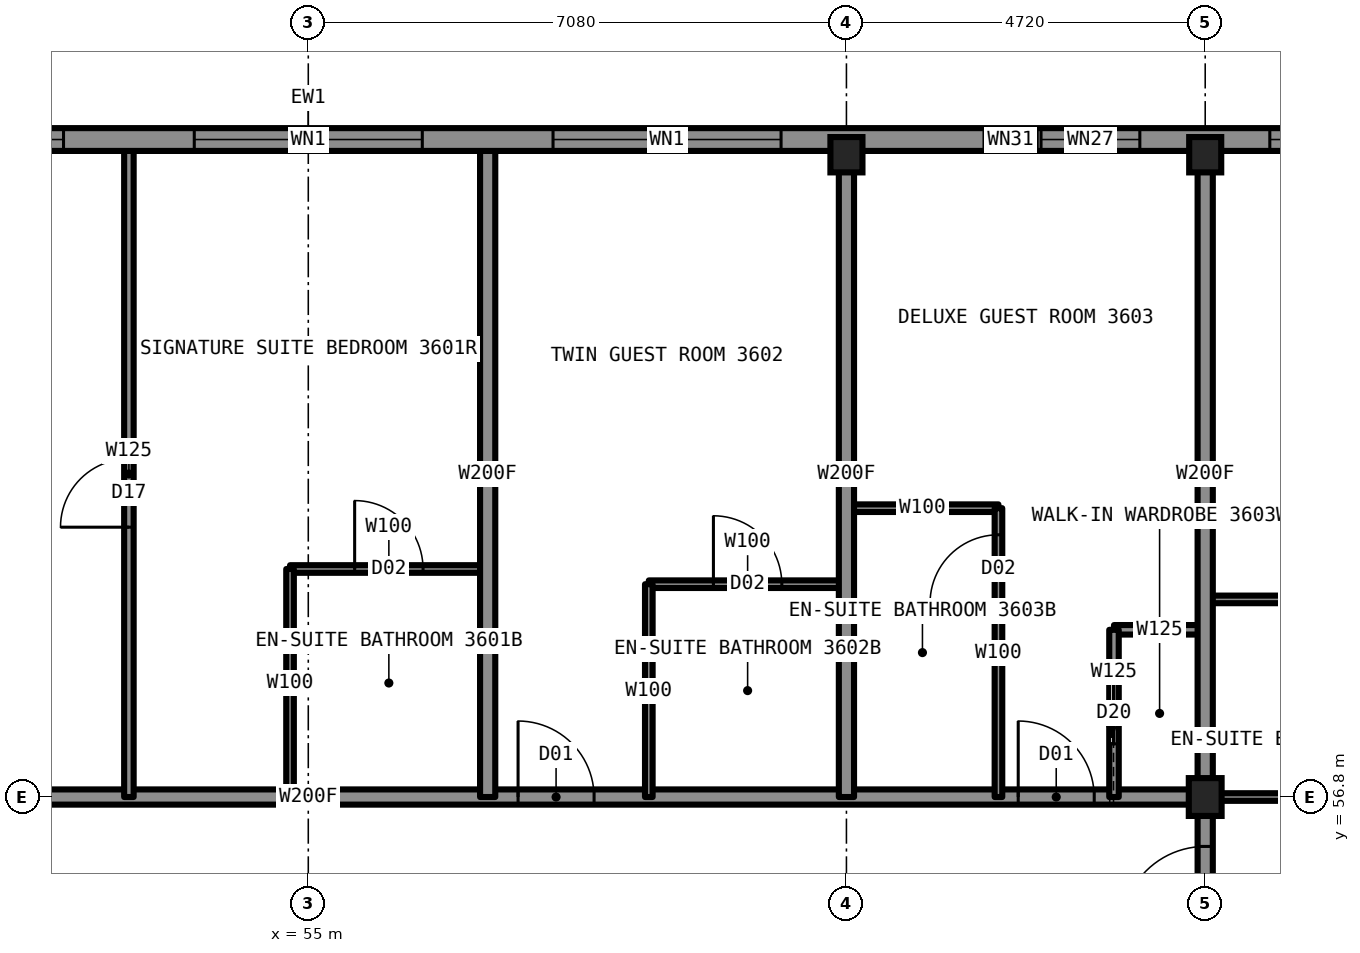
"""IFC4 building model, lengths in metres.
Left out: names, types, materials, properties, quantities, classifications, styles, units other than length and angle.
Written with IfcOpenShell. Run it as: python <this file> out.ifc"""

import sys

from ifc_helpers import new_model, si_unit, direction, frame, frame_2d, origin, origin_2d, place, context, subcontext, project, spatial, rectangle, i_section, extrude, element, fill, save


model = new_model("IFC4")
c1 = context("Model", 3, precision=1e-05, world=origin(), true_north=direction((0.0, 1.0)))
c2 = subcontext(c1, "Body", "Model", "MODEL_VIEW")
j1 = project(units=[si_unit("LENGTHUNIT", "METRE"), si_unit("PLANEANGLEUNIT", "RADIAN")], contexts=[c1])
p1 = place(None, origin())
s1 = spatial("IfcSite", under=j1, at=p1, CompositionType="ELEMENT")
p2 = place(p1, origin())
s2 = spatial("IfcBuilding", under=s1, at=p2, CompositionType="ELEMENT")
p3 = place(p2, frame((0.0, 0.0, 135.4)))
s3 = spatial("IfcBuildingStorey", under=s2, at=p3, CompositionType="ELEMENT", Elevation=135.4)
for number, where, z_axis, x_axis in (
    (1, (62.08, 65.25, 0.0), (0.0, 0.0, 1.0), (1.0, 0.0, 0.0)),
    (2, (66.8, 65.25, 0.0), (0.0, 0.0, 1.0), (1.0, 0.0, 0.0)),
):
    element("IfcColumn", number, at=place(p3, frame(where, z_axis=z_axis, x_axis=x_axis)), inside=s3, PredefinedType="COLUMN", context=c2, shape_type="SweptSolid", body=[
        extrude(i_section(OverallWidth=0.422, OverallDepth=0.465, WebThickness=0.045, FlangeThickness=0.073, at=origin_2d()), origin(), (0.0, 0.0, 1.0), 3.5),
    ])
p4 = place(p3, frame((66.8, 56.8, 0.0), z_axis=(0.0, 0.0, 1.0), x_axis=(1.0, 0.0, 0.0)))
e3 = element("IfcColumn", 3, at=p4, inside=s3, PredefinedType="COLUMN", context=c2, shape_type="SweptSolid", body=[
    extrude(i_section(OverallWidth=0.432, OverallDepth=0.498, WebThickness=0.056, FlangeThickness=0.089, at=origin_2d()), origin(), (0.0, 0.0, 1.0), 3.5),
])
p5 = place(p3, frame((66.8, 56.8, 0.0), z_axis=(0.0, 0.0, 1.0), x_axis=(1.0, 0.0, 0.0)))
e4 = element("IfcWall", 4, at=p5, inside=s3, PredefinedType="PARTITIONING", context=c2, shape_type="SweptSolid", body=[
    extrude(rectangle(XDim=2.6, YDim=0.1, at=frame_2d((1.3, 0.0))), origin(), (0.0, 0.0, 1.0), 2.573),
])
p6 = place(p3, frame((43.2, 56.8, 0.0), z_axis=(0.0, 0.0, 1.0), x_axis=(1.0, 0.0, 0.0)))
e5 = element("IfcWall", 5, at=p6, inside=s3, PredefinedType="PARTITIONING", context=c2, shape_type="SweptSolid", body=[
    extrude(rectangle(XDim=23.6, YDim=0.2, at=frame_2d((11.8, 0.0))), origin(), (0.0, 0.0, 1.0), 3.33),
])
p7 = place(p6, frame((1.85, 0.0, 0.0)))
e6 = element("IfcOpeningElement", 6, at=p7, cuts=e5, PredefinedType="OPENING", context=c2, shape_type="SweptSolid", body=[
    extrude(rectangle(XDim=1.1, YDim=2.2, at=frame_2d((0.55, 1.1))), frame((0.0, 0.11, 0.0), z_axis=(0.0, -1.0, 0.0), x_axis=(1.0, 0.0, 0.0)), (0.0, 0.0, 1.0), 0.22),
])
p8 = place(p6, frame((14.56, 0.0, 0.0)))
e7 = element("IfcOpeningElement", 7, at=p8, cuts=e5, PredefinedType="OPENING", context=c2, shape_type="SweptSolid", body=[
    extrude(rectangle(XDim=1.0, YDim=2.2, at=frame_2d((0.5, 1.1))), frame((0.0, 0.11, 0.0), z_axis=(0.0, -1.0, 0.0), x_axis=(1.0, 0.0, 0.0)), (0.0, 0.0, 1.0), 0.22),
])
p9 = place(p6, frame((21.14, 0.0, 0.0)))
e8 = element("IfcOpeningElement", 8, at=p9, cuts=e5, PredefinedType="OPENING", context=c2, shape_type="SweptSolid", body=[
    extrude(rectangle(XDim=1.0, YDim=2.2, at=frame_2d((0.5, 1.1))), frame((0.0, 0.11, 0.0), z_axis=(0.0, -1.0, 0.0), x_axis=(1.0, 0.0, 0.0)), (0.0, 0.0, 1.0), 0.22),
])
p10 = place(p3, frame((65.6, 59.0, 0.0), z_axis=(0.0, 0.0, 1.0), x_axis=(1.0, 0.0, 0.0)))
e9 = element("IfcWall", 9, at=p10, inside=s3, PredefinedType="PARTITIONING", context=c2, shape_type="SweptSolid", body=[
    extrude(rectangle(XDim=1.2, YDim=0.125, at=frame_2d((0.6, 0.0))), origin(), (0.0, 0.0, 1.0), 3.33),
])
p11 = place(p3, frame((66.8, 59.4, 0.0), z_axis=(0.0, 0.0, 1.0), x_axis=(1.0, 0.0, 0.0)))
e10 = element("IfcWall", 10, at=p11, inside=s3, PredefinedType="PARTITIONING", context=c2, shape_type="SweptSolid", body=[
    extrude(rectangle(XDim=2.6, YDim=0.1, at=frame_2d((1.3, 0.0))), origin(), (0.0, 0.0, 1.0), 3.33),
])
p12 = place(p3, frame((59.48, 59.6, 0.0), z_axis=(0.0, 0.0, 1.0), x_axis=(1.0, 0.0, 0.0)))
e11 = element("IfcWall", 11, at=p12, inside=s3, PredefinedType="PARTITIONING", context=c2, shape_type="SweptSolid", body=[
    extrude(rectangle(XDim=2.6, YDim=0.1, at=frame_2d((1.3, 0.0))), origin(), (0.0, 0.0, 1.0), 3.33),
])
p13 = place(p12, frame((0.85, 0.0, 0.0)))
e12 = element("IfcOpeningElement", 12, at=p13, cuts=e11, PredefinedType="OPENING", context=c2, shape_type="SweptSolid", body=[
    extrude(rectangle(XDim=0.9, YDim=2.1, at=frame_2d((0.45, 1.05))), frame((0.0, 0.06, 0.0), z_axis=(0.0, -1.0, 0.0), x_axis=(1.0, 0.0, 0.0)), (0.0, 0.0, 1.0), 0.12),
])
p14 = place(p3, frame((54.76, 59.8, 0.0), z_axis=(0.0, 0.0, 1.0), x_axis=(1.0, 0.0, 0.0)))
e13 = element("IfcWall", 13, at=p14, inside=s3, PredefinedType="PARTITIONING", context=c2, shape_type="SweptSolid", body=[
    extrude(rectangle(XDim=2.6, YDim=0.1, at=frame_2d((1.3, 0.0))), origin(), (0.0, 0.0, 1.0), 3.33),
])
p15 = place(p14, frame((0.85, 0.0, 0.0)))
e14 = element("IfcOpeningElement", 14, at=p15, cuts=e13, PredefinedType="OPENING", context=c2, shape_type="SweptSolid", body=[
    extrude(rectangle(XDim=0.9, YDim=2.1, at=frame_2d((0.45, 1.05))), frame((0.0, 0.06, 0.0), z_axis=(0.0, -1.0, 0.0), x_axis=(1.0, 0.0, 0.0)), (0.0, 0.0, 1.0), 0.12),
])
p16 = place(p3, frame((62.08, 60.6, 0.0), z_axis=(0.0, 0.0, 1.0), x_axis=(1.0, 0.0, 0.0)))
e15 = element("IfcWall", 15, at=p16, inside=s3, PredefinedType="PARTITIONING", context=c2, shape_type="SweptSolid", body=[
    extrude(rectangle(XDim=2.0, YDim=0.1, at=frame_2d((1.0, 0.0))), origin(), (0.0, 0.0, 1.0), 3.33),
])
p17 = place(p3, frame((54.76, 56.8, 0.0), z_axis=(0.0, 0.0, 1.0), x_axis=(0.0, 1.0, 0.0)))
e16 = element("IfcWall", 16, at=p17, inside=s3, PredefinedType="PARTITIONING", context=c2, shape_type="SweptSolid", body=[
    extrude(rectangle(XDim=3.0, YDim=0.1, at=frame_2d((1.5, 0.0))), origin(), (0.0, 0.0, 1.0), 3.33),
])
p18 = place(p3, frame((52.64, 56.8, 0.0), z_axis=(0.0, 0.0, 1.0), x_axis=(0.0, 1.0, 0.0)))
e17 = element("IfcWall", 17, at=p18, inside=s3, PredefinedType="PARTITIONING", context=c2, shape_type="SweptSolid", body=[
    extrude(rectangle(XDim=8.5, YDim=0.125, at=frame_2d((4.25, 0.0))), origin(), (0.0, 0.0, 1.0), 3.33),
])
p19 = place(p18, frame((3.55, 0.0, 0.0)))
e18 = element("IfcOpeningElement", 18, at=p19, cuts=e17, PredefinedType="OPENING", context=c2, shape_type="SweptSolid", body=[
    extrude(rectangle(XDim=0.9, YDim=2.2, at=frame_2d((0.45, 1.1))), frame((0.0, 0.073, 0.0), z_axis=(0.0, -1.0, 0.0), x_axis=(1.0, 0.0, 0.0)), (0.0, 0.0, 1.0), 0.145),
])
p20 = place(p3, frame((65.6, 56.8, 0.0), z_axis=(0.0, 0.0, 1.0), x_axis=(0.0, 1.0, 0.0)))
e19 = element("IfcWall", 19, at=p20, inside=s3, PredefinedType="PARTITIONING", context=c2, shape_type="SweptSolid", body=[
    extrude(rectangle(XDim=2.2, YDim=0.125, at=frame_2d((1.1, 0.0))), origin(), (0.0, 0.0, 1.0), 3.33),
])
p21 = place(p20, frame((0.7, 0.0, 0.0)))
e20 = element("IfcOpeningElement", 20, at=p21, cuts=e19, PredefinedType="OPENING", context=c2, shape_type="SweptSolid", body=[
    extrude(rectangle(XDim=0.8, YDim=2.1, at=frame_2d((0.4, 1.05))), frame((0.0, 0.073, 0.0), z_axis=(0.0, -1.0, 0.0), x_axis=(1.0, 0.0, 0.0)), (0.0, 0.0, 1.0), 0.145),
])
p22 = place(p3, frame((66.8, 33.2, 0.0), z_axis=(0.0, 0.0, 1.0), x_axis=(0.0, 1.0, 0.0)))
e21 = element("IfcWall", 21, at=p22, inside=s3, PredefinedType="PARTITIONING", context=c2, shape_type="SweptSolid", body=[
    extrude(rectangle(XDim=23.6, YDim=0.2, at=frame_2d((11.8, 0.0))), origin(), (0.0, 0.0, 1.0), 3.33),
])
p23 = place(p22, frame((7.27, 0.0, 0.0)))
e22 = element("IfcOpeningElement", 22, at=p23, cuts=e21, PredefinedType="OPENING", context=c2, shape_type="SweptSolid", body=[
    extrude(rectangle(XDim=1.0, YDim=2.2, at=frame_2d((0.5, 1.1))), frame((0.0, 0.11, 0.0), z_axis=(0.0, -1.0, 0.0), x_axis=(1.0, 0.0, 0.0)), (0.0, 0.0, 1.0), 0.22),
])
p24 = place(p22, frame((11.99, 0.0, 0.0)))
e23 = element("IfcOpeningElement", 23, at=p24, cuts=e21, PredefinedType="OPENING", context=c2, shape_type="SweptSolid", body=[
    extrude(rectangle(XDim=1.0, YDim=2.2, at=frame_2d((0.5, 1.1))), frame((0.0, 0.11, 0.0), z_axis=(0.0, -1.0, 0.0), x_axis=(1.0, 0.0, 0.0)), (0.0, 0.0, 1.0), 0.22),
])
p25 = place(p22, frame((17.31, 0.0, 0.0)))
e24 = element("IfcOpeningElement", 24, at=p25, cuts=e21, PredefinedType="OPENING", context=c2, shape_type="SweptSolid", body=[
    extrude(rectangle(XDim=1.0, YDim=2.2, at=frame_2d((0.5, 1.1))), frame((0.0, 0.11, 0.0), z_axis=(0.0, -1.0, 0.0), x_axis=(1.0, 0.0, 0.0)), (0.0, 0.0, 1.0), 0.22),
])
p26 = place(p22, frame((21.85, 0.0, 0.0)))
e25 = element("IfcOpeningElement", 25, at=p26, cuts=e21, PredefinedType="OPENING", context=c2, shape_type="SweptSolid", body=[
    extrude(rectangle(XDim=1.1, YDim=2.2, at=frame_2d((0.55, 1.1))), frame((0.0, 0.11, 0.0), z_axis=(0.0, -1.0, 0.0), x_axis=(1.0, 0.0, 0.0)), (0.0, 0.0, 1.0), 0.22),
])
p27 = place(p22, frame((0.65, 0.0, 0.0)))
e26 = element("IfcOpeningElement", 26, at=p27, cuts=e21, PredefinedType="OPENING", context=c2, shape_type="SweptSolid", body=[
    extrude(rectangle(XDim=1.1, YDim=2.2, at=frame_2d((0.55, 1.1))), frame((0.0, 0.11, 0.0), z_axis=(0.0, -1.0, 0.0), x_axis=(1.0, 0.0, 0.0)), (0.0, 0.0, 1.0), 0.22),
])
p28 = place(p3, frame((66.8, 56.8, 0.0), z_axis=(0.0, 0.0, 1.0), x_axis=(0.0, 1.0, 0.0)))
e27 = element("IfcWall", 27, at=p28, inside=s3, PredefinedType="PARTITIONING", context=c2, shape_type="SweptSolid", body=[
    extrude(rectangle(XDim=8.5, YDim=0.2, at=frame_2d((4.25, 0.0))), origin(), (0.0, 0.0, 1.0), 2.573),
])
p29 = place(p3, frame((57.36, 56.8, 0.0), z_axis=(0.0, 0.0, 1.0), x_axis=(0.0, 1.0, 0.0)))
e28 = element("IfcWall", 28, at=p29, inside=s3, PredefinedType="PARTITIONING", context=c2, shape_type="SweptSolid", body=[
    extrude(rectangle(XDim=8.5, YDim=0.2, at=frame_2d((4.25, 0.0))), origin(), (0.0, 0.0, 1.0), 3.33),
])
p30 = place(p3, frame((59.48, 56.8, 0.0), z_axis=(0.0, 0.0, 1.0), x_axis=(0.0, 1.0, 0.0)))
e29 = element("IfcWall", 29, at=p30, inside=s3, PredefinedType="PARTITIONING", context=c2, shape_type="SweptSolid", body=[
    extrude(rectangle(XDim=2.8, YDim=0.1, at=frame_2d((1.4, 0.0))), origin(), (0.0, 0.0, 1.0), 3.33),
])
p31 = place(p3, frame((62.08, 56.8, 0.0), z_axis=(0.0, 0.0, 1.0), x_axis=(0.0, 1.0, 0.0)))
e30 = element("IfcWall", 30, at=p31, inside=s3, PredefinedType="PARTITIONING", context=c2, shape_type="SweptSolid", body=[
    extrude(rectangle(XDim=8.5, YDim=0.2, at=frame_2d((4.25, 0.0))), origin(), (0.0, 0.0, 1.0), 2.573),
])
p32 = place(p3, frame((64.08, 56.8, 0.0), z_axis=(0.0, 0.0, 1.0), x_axis=(0.0, 1.0, 0.0)))
e31 = element("IfcWall", 31, at=p32, inside=s3, PredefinedType="PARTITIONING", context=c2, shape_type="SweptSolid", body=[
    extrude(rectangle(XDim=3.8, YDim=0.1, at=frame_2d((1.9, 0.0))), origin(), (0.0, 0.0, 1.0), 3.33),
])
p33 = place(p32, frame((2.55, 0.0, 0.0)))
e32 = element("IfcOpeningElement", 32, at=p33, cuts=e31, PredefinedType="OPENING", context=c2, shape_type="SweptSolid", body=[
    extrude(rectangle(XDim=0.9, YDim=2.1, at=frame_2d((0.45, 1.05))), frame((0.0, 0.06, 0.0), z_axis=(0.0, -1.0, 0.0), x_axis=(1.0, 0.0, 0.0)), (0.0, 0.0, 1.0), 0.12),
])
p34 = place(p3, frame((70.1, 65.45, 0.0), z_axis=(0.0, 0.0, 1.0), x_axis=(-1.0, 0.0, 0.0)))
e33 = element("IfcWall", 33, at=p34, inside=s3, PredefinedType="SOLIDWALL", context=c2, shape_type="SweptSolid", body=[
    extrude(rectangle(XDim=30.2, YDim=0.3, at=frame_2d((15.1, 0.0))), origin(), (0.0, 0.0, 1.0), 2.83),
])
p35 = place(p34, frame((0.85, 0.0, 0.5)))
e34 = element("IfcOpeningElement", 34, at=p35, cuts=e33, PredefinedType="OPENING", context=c2, shape_type="SweptSolid", body=[
    extrude(rectangle(XDim=1.6, YDim=2.0, at=frame_2d((0.8, 1.0))), frame((0.0, 0.16, 0.0), z_axis=(0.0, -1.0, 0.0), x_axis=(1.0, 0.0, 0.0)), (0.0, 0.0, 1.0), 0.32),
])
p36 = place(p34, frame((4.16, 0.0, 0.5)))
e35 = element("IfcOpeningElement", 35, at=p36, cuts=e33, PredefinedType="OPENING", context=c2, shape_type="SweptSolid", body=[
    extrude(rectangle(XDim=1.3, YDim=1.9, at=frame_2d((0.65, 0.95))), frame((0.0, 0.16, 0.0), z_axis=(0.0, -1.0, 0.0), x_axis=(1.0, 0.0, 0.0)), (0.0, 0.0, 1.0), 0.32),
])
p37 = place(p34, frame((8.88, 0.0, 0.5)))
e36 = element("IfcOpeningElement", 36, at=p37, cuts=e33, PredefinedType="OPENING", context=c2, shape_type="SweptSolid", body=[
    extrude(rectangle(XDim=3.0, YDim=2.0, at=frame_2d((1.5, 1.0))), frame((0.0, 0.16, 0.0), z_axis=(0.0, -1.0, 0.0), x_axis=(1.0, 0.0, 0.0)), (0.0, 0.0, 1.0), 0.32),
])
p38 = place(p34, frame((13.6, 0.0, 0.5)))
e37 = element("IfcOpeningElement", 37, at=p38, cuts=e33, PredefinedType="OPENING", context=c2, shape_type="SweptSolid", body=[
    extrude(rectangle(XDim=3.0, YDim=2.0, at=frame_2d((1.5, 1.0))), frame((0.0, 0.16, 0.0), z_axis=(0.0, -1.0, 0.0), x_axis=(1.0, 0.0, 0.0)), (0.0, 0.0, 1.0), 0.32),
])
p39 = place(p34, frame((18.32, 0.0, 0.5)))
e38 = element("IfcOpeningElement", 38, at=p39, cuts=e33, PredefinedType="OPENING", context=c2, shape_type="SweptSolid", body=[
    extrude(rectangle(XDim=3.0, YDim=2.0, at=frame_2d((1.5, 1.0))), frame((0.0, 0.16, 0.0), z_axis=(0.0, -1.0, 0.0), x_axis=(1.0, 0.0, 0.0)), (0.0, 0.0, 1.0), 0.32),
])
p40 = place(p34, frame((24.69, 0.0, 0.5)))
e39 = element("IfcOpeningElement", 39, at=p40, cuts=e33, PredefinedType="OPENING", context=c2, shape_type="SweptSolid", body=[
    extrude(rectangle(XDim=1.3, YDim=1.9, at=frame_2d((0.65, 0.95))), frame((0.0, 0.16, 0.0), z_axis=(0.0, -1.0, 0.0), x_axis=(1.0, 0.0, 0.0)), (0.0, 0.0, 1.0), 0.32),
])
p41 = place(p34, frame((27.75, 0.0, 0.5)))
e40 = element("IfcOpeningElement", 40, at=p41, cuts=e33, PredefinedType="OPENING", context=c2, shape_type="SweptSolid", body=[
    extrude(rectangle(XDim=1.6, YDim=2.0, at=frame_2d((0.8, 1.0))), frame((0.0, 0.16, 0.0), z_axis=(0.0, -1.0, 0.0), x_axis=(1.0, 0.0, 0.0)), (0.0, 0.0, 1.0), 0.32),
])
p42 = place(p34, frame((5.51, 0.0, 0.5)))
e41 = element("IfcOpeningElement", 41, at=p42, cuts=e33, PredefinedType="OPENING", context=c2, shape_type="SweptSolid", body=[
    extrude(rectangle(XDim=0.7, YDim=0.9, at=frame_2d((0.35, 0.45))), frame((0.0, 0.16, 0.0), z_axis=(0.0, -1.0, 0.0), x_axis=(1.0, 0.0, 0.0)), (0.0, 0.0, 1.0), 0.32),
])
p43 = place(p34, frame((23.99, 0.0, 0.5)))
e42 = element("IfcOpeningElement", 42, at=p43, cuts=e33, PredefinedType="OPENING", context=c2, shape_type="SweptSolid", body=[
    extrude(rectangle(XDim=0.7, YDim=0.9, at=frame_2d((0.35, 0.45))), frame((0.0, 0.16, 0.0), z_axis=(0.0, -1.0, 0.0), x_axis=(1.0, 0.0, 0.0)), (0.0, 0.0, 1.0), 0.32),
])
p44 = place(p15, origin())
e43 = element("IfcDoor", 43, at=p44, inside=s3, OperationType="SINGLE_SWING_RIGHT", PredefinedType="DOOR", context=c2, shape_type="SweptSolid", body=[
    extrude(rectangle(XDim=0.9, YDim=2.1, at=frame_2d((0.45, 1.05))), frame((0.0, 0.025, 0.0), z_axis=(0.0, -1.0, 0.0), x_axis=(1.0, 0.0, 0.0)), (0.0, 0.0, 1.0), 0.05),
])
fill(e14, e43)
p45 = place(p19, origin())
e44 = element("IfcDoor", 44, at=p45, inside=s3, OperationType="SINGLE_SWING_LEFT", PredefinedType="DOOR", context=c2, shape_type="SweptSolid", body=[
    extrude(rectangle(XDim=0.9, YDim=2.2, at=frame_2d((0.45, 1.1))), frame((0.0, 0.025, 0.0), z_axis=(0.0, -1.0, 0.0), x_axis=(1.0, 0.0, 0.0)), (0.0, 0.0, 1.0), 0.05),
])
fill(e18, e44)
p46 = place(p8, origin())
e45 = element("IfcDoor", 45, at=p46, inside=s3, OperationType="SINGLE_SWING_LEFT", PredefinedType="DOOR", context=c2, shape_type="SweptSolid", body=[
    extrude(rectangle(XDim=1.0, YDim=2.2, at=frame_2d((0.5, 1.1))), frame((0.0, 0.025, 0.0), z_axis=(0.0, -1.0, 0.0), x_axis=(1.0, 0.0, 0.0)), (0.0, 0.0, 1.0), 0.05),
])
fill(e7, e45)
p47 = place(p13, origin())
e46 = element("IfcDoor", 46, at=p47, inside=s3, OperationType="SINGLE_SWING_RIGHT", PredefinedType="DOOR", context=c2, shape_type="SweptSolid", body=[
    extrude(rectangle(XDim=0.9, YDim=2.1, at=frame_2d((0.45, 1.05))), frame((0.0, 0.025, 0.0), z_axis=(0.0, -1.0, 0.0), x_axis=(1.0, 0.0, 0.0)), (0.0, 0.0, 1.0), 0.05),
])
fill(e12, e46)
p48 = place(p9, origin())
e47 = element("IfcDoor", 47, at=p48, inside=s3, OperationType="SINGLE_SWING_LEFT", PredefinedType="DOOR", context=c2, shape_type="SweptSolid", body=[
    extrude(rectangle(XDim=1.0, YDim=2.2, at=frame_2d((0.5, 1.1))), frame((0.0, 0.025, 0.0), z_axis=(0.0, -1.0, 0.0), x_axis=(1.0, 0.0, 0.0)), (0.0, 0.0, 1.0), 0.05),
])
fill(e8, e47)
p49 = place(p33, origin())
e48 = element("IfcDoor", 48, at=p49, inside=s3, OperationType="SINGLE_SWING_RIGHT", PredefinedType="DOOR", context=c2, shape_type="SweptSolid", body=[
    extrude(rectangle(XDim=0.9, YDim=2.1, at=frame_2d((0.45, 1.05))), frame((0.0, 0.025, 0.0), z_axis=(0.0, -1.0, 0.0), x_axis=(1.0, 0.0, 0.0)), (0.0, 0.0, 1.0), 0.05),
])
fill(e32, e48)
p50 = place(p21, origin())
e49 = element("IfcDoor", 49, at=p50, inside=s3, OperationType="SLIDING_TO_LEFT", PredefinedType="DOOR", context=c2, shape_type="SweptSolid", body=[
    extrude(rectangle(XDim=0.8, YDim=2.1, at=frame_2d((0.4, 1.05))), frame((0.0, 0.025, 0.0), z_axis=(0.0, -1.0, 0.0), x_axis=(1.0, 0.0, 0.0)), (0.0, 0.0, 1.0), 0.05),
])
fill(e20, e49)
p51 = place(p26, origin())
e50 = element("IfcDoor", 50, at=p51, inside=s3, OperationType="SINGLE_SWING_LEFT", PredefinedType="DOOR", context=c2, shape_type="SweptSolid", body=[
    extrude(rectangle(XDim=1.1, YDim=2.2, at=frame_2d((0.55, 1.1))), frame((0.0, 0.025, 0.0), z_axis=(0.0, -1.0, 0.0), x_axis=(1.0, 0.0, 0.0)), (0.0, 0.0, 1.0), 0.05),
])
fill(e25, e50)
p52 = place(p35, origin())
e51 = element("IfcWindow", 51, at=p52, inside=s3, PartitioningType="SINGLE_PANEL", PredefinedType="WINDOW", context=c2, shape_type="SweptSolid", body=[
    extrude(rectangle(XDim=1.6, YDim=2.0, at=frame_2d((0.8, 1.0))), frame((0.0, 0.03, 0.0), z_axis=(0.0, -1.0, 0.0), x_axis=(1.0, 0.0, 0.0)), (0.0, 0.0, 1.0), 0.06),
])
fill(e34, e51)
p53 = place(p36, origin())
e52 = element("IfcWindow", 52, at=p53, inside=s3, PartitioningType="SINGLE_PANEL", PredefinedType="WINDOW", context=c2, shape_type="SweptSolid", body=[
    extrude(rectangle(XDim=1.3, YDim=1.9, at=frame_2d((0.65, 0.95))), frame((0.0, 0.03, 0.0), z_axis=(0.0, -1.0, 0.0), x_axis=(1.0, 0.0, 0.0)), (0.0, 0.0, 1.0), 0.06),
])
fill(e35, e52)
p54 = place(p37, origin())
e53 = element("IfcWindow", 53, at=p54, inside=s3, PartitioningType="SINGLE_PANEL", PredefinedType="WINDOW", context=c2, shape_type="SweptSolid", body=[
    extrude(rectangle(XDim=3.0, YDim=2.0, at=frame_2d((1.5, 1.0))), frame((0.0, 0.03, 0.0), z_axis=(0.0, -1.0, 0.0), x_axis=(1.0, 0.0, 0.0)), (0.0, 0.0, 1.0), 0.06),
])
fill(e36, e53)
p55 = place(p38, origin())
e54 = element("IfcWindow", 54, at=p55, inside=s3, PartitioningType="SINGLE_PANEL", PredefinedType="WINDOW", context=c2, shape_type="SweptSolid", body=[
    extrude(rectangle(XDim=3.0, YDim=2.0, at=frame_2d((1.5, 1.0))), frame((0.0, 0.03, 0.0), z_axis=(0.0, -1.0, 0.0), x_axis=(1.0, 0.0, 0.0)), (0.0, 0.0, 1.0), 0.06),
])
fill(e37, e54)
p56 = place(p39, origin())
e55 = element("IfcWindow", 55, at=p56, inside=s3, PartitioningType="SINGLE_PANEL", PredefinedType="WINDOW", context=c2, shape_type="SweptSolid", body=[
    extrude(rectangle(XDim=3.0, YDim=2.0, at=frame_2d((1.5, 1.0))), frame((0.0, 0.03, 0.0), z_axis=(0.0, -1.0, 0.0), x_axis=(1.0, 0.0, 0.0)), (0.0, 0.0, 1.0), 0.06),
])
fill(e38, e55)
p57 = place(p42, origin())
e56 = element("IfcWindow", 56, at=p57, inside=s3, PartitioningType="SINGLE_PANEL", PredefinedType="WINDOW", context=c2, shape_type="SweptSolid", body=[
    extrude(rectangle(XDim=0.7, YDim=0.9, at=frame_2d((0.35, 0.45))), frame((0.0, 0.03, 0.0), z_axis=(0.0, -1.0, 0.0), x_axis=(1.0, 0.0, 0.0)), (0.0, 0.0, 1.0), 0.06),
])
fill(e41, e56)
save(model, sys.argv[1])
